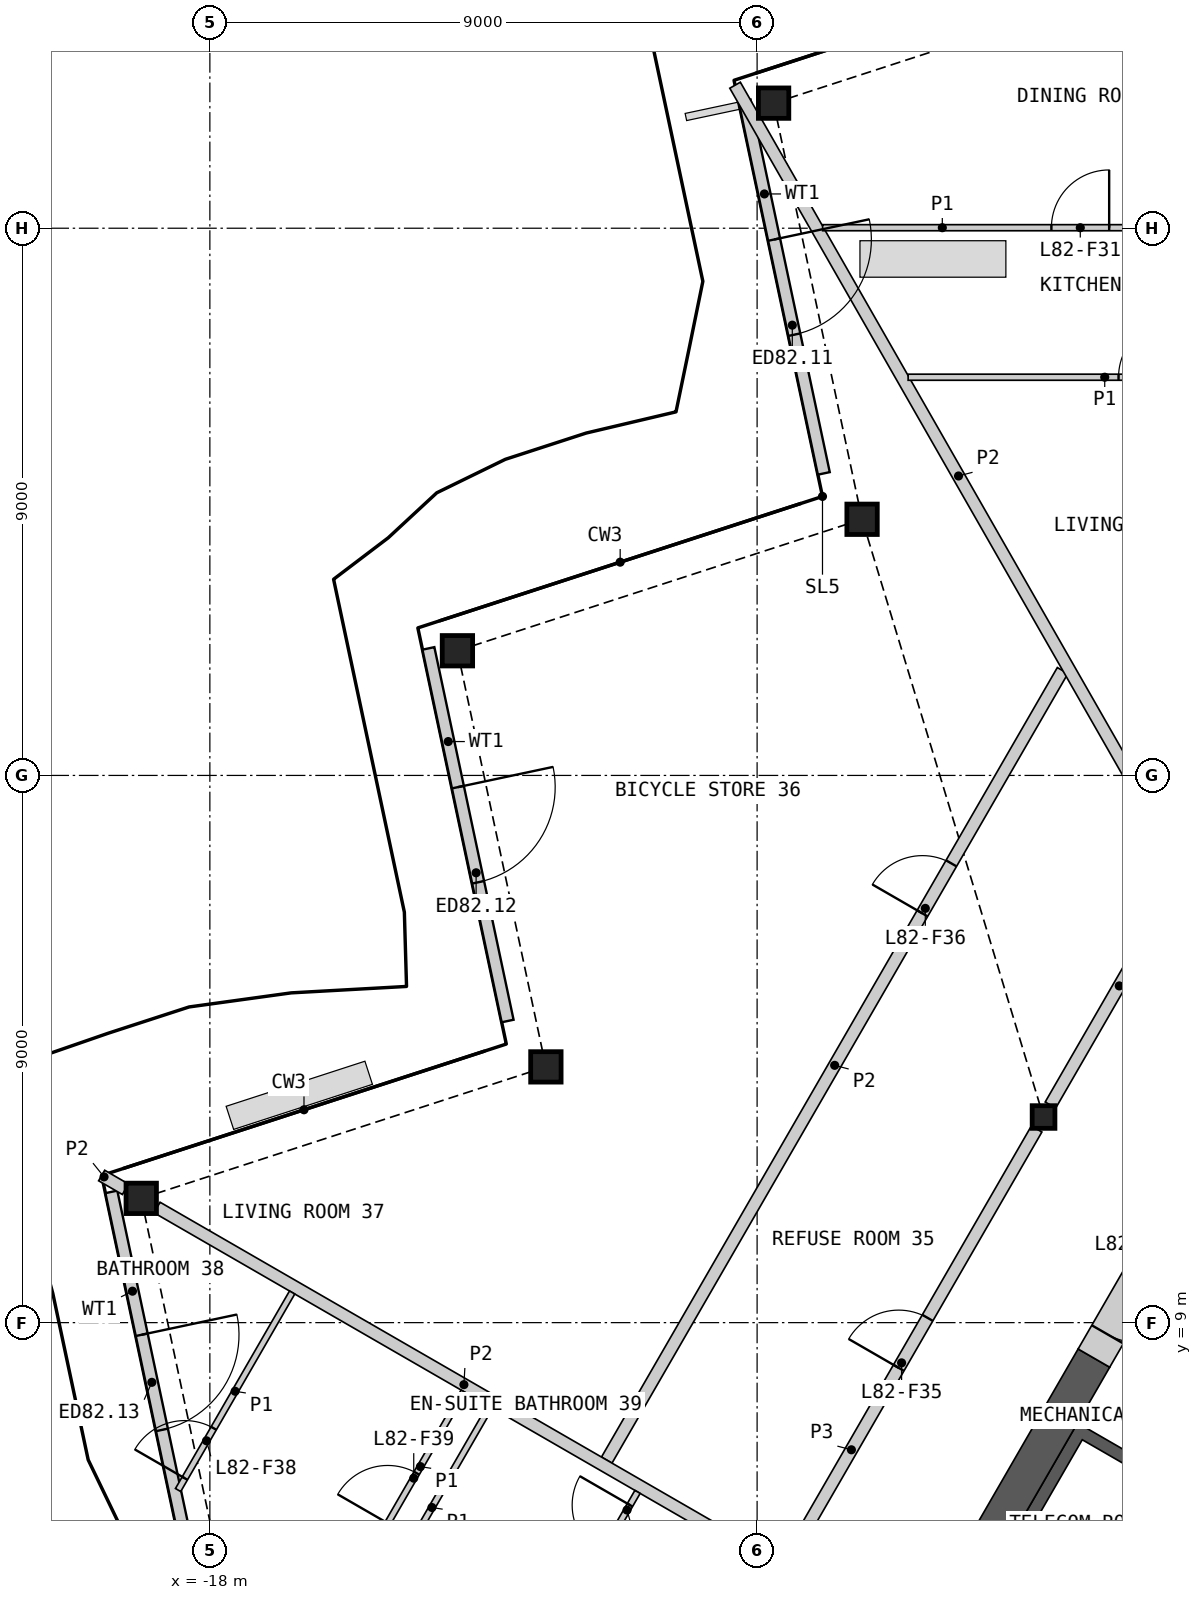
"""IFC4 building model, lengths in metres.
Left out: names, types, materials, properties, quantities, classifications, styles, units other than length and angle.
Written with IfcOpenShell. Run it as: python <this file> out.ifc"""

import sys

from ifc_helpers import new_model, si_unit, direction, frame, frame_2d, origin, origin_2d, place, context, subcontext, project, spatial, polyline, rectangle, hollow_rectangle, i_section, outline, extrude, element, fill, save


model = new_model("IFC4")
c1 = context("Model", 3, precision=1e-05, world=origin(), true_north=direction((0.0, 1.0)))
c2 = subcontext(c1, "Body", "Model", "MODEL_VIEW")
j1 = project(units=[si_unit("LENGTHUNIT", "METRE"), si_unit("PLANEANGLEUNIT", "RADIAN")], contexts=[c1])
p1 = place(None, origin())
s1 = spatial("IfcSite", under=j1, at=p1, CompositionType="ELEMENT")
p2 = place(p1, origin())
s2 = spatial("IfcBuilding", under=s1, at=p2, CompositionType="ELEMENT")
p3 = place(p2, frame((0.0, 0.0, 367.8)))
s3 = spatial("IfcBuildingStorey", under=s2, at=p3, CompositionType="ELEMENT", Elevation=367.8)
for number, where, z_axis, x_axis in (
    (1, (-8.729, 29.057, 0.0), (0.0, 0.0, 1.0), (1.0, 0.0, 0.0)),
    (2, (-7.274, 22.213, 0.0), (0.0, 0.0, 1.0), (1.0, 0.0, 0.0)),
    (3, (-13.929, 20.051, 0.0), (0.0, 0.0, 1.0), (1.0, 0.0, 0.0)),
    (4, (-12.474, 13.206, 0.0), (0.0, 0.0, 1.0), (1.0, 0.0, 0.0)),
    (5, (-19.129, 11.044, 0.0), (0.0, 0.0, 1.0), (1.0, 0.0, 0.0)),
):
    element("IfcColumn", number, at=place(p3, frame(where, z_axis=z_axis, x_axis=x_axis)), inside=s3, PredefinedType="COLUMN", context=c2, shape_type="SweptSolid", body=[
        extrude(hollow_rectangle(XDim=0.5, YDim=0.5, WallThickness=0.03, at=origin_2d()), origin(), (0.0, 0.0, 1.0), 3.4),
    ])
p4 = place(p3, frame((-4.289, 12.382, 0.0), z_axis=(0.0, 0.0, 1.0), x_axis=(1.0, 0.0, 0.0)))
e6 = element("IfcColumn", 6, at=p4, inside=s3, PredefinedType="COLUMN", context=c2, shape_type="SweptSolid", body=[
    extrude(i_section(OverallWidth=0.374, OverallDepth=0.372, WebThickness=0.016, FlangeThickness=0.026, at=origin_2d()), origin(), (0.0, 0.0, 1.0), 3.4),
])
p5 = place(p3, frame((-9.206, 29.096, 0.0), z_axis=(0.0, 0.0, 1.0), x_axis=(0.207889514624, -0.978152314167, 0.0)))
e7 = element("IfcWall", 7, at=p5, inside=s3, PredefinedType="SOLIDWALL", context=c2, shape_type="SweptSolid", body=[
    extrude(rectangle(XDim=6.265, YDim=0.2, at=frame_2d((3.133, 0.0))), origin(), (0.0, 0.0, 1.0), 2.634),
])
p6 = place(p5, frame((2.333, 0.0, 0.0)))
e8 = element("IfcOpeningElement", 8, at=p6, cuts=e7, PredefinedType="OPENING", context=c2, shape_type="SweptSolid", body=[
    extrude(rectangle(XDim=1.6, YDim=2.25, at=frame_2d((0.8, 1.125))), frame((0.0, 0.11, 0.0), z_axis=(0.0, -1.0, 0.0), x_axis=(1.0, 0.0, 0.0)), (0.0, 0.0, 1.0), 0.22),
])
p7 = place(p3, frame((-14.406, 20.089, 0.0), z_axis=(0.0, 0.0, 1.0), x_axis=(0.207889514624, -0.978152314167, 0.0)))
e9 = element("IfcWall", 9, at=p7, inside=s3, PredefinedType="SOLIDWALL", context=c2, shape_type="SweptSolid", body=[
    extrude(rectangle(XDim=6.265, YDim=0.2, at=frame_2d((3.133, 0.0))), origin(), (0.0, 0.0, 1.0), 2.634),
])
p8 = place(p7, frame((2.333, 0.0, 0.0)))
e10 = element("IfcOpeningElement", 10, at=p8, cuts=e9, PredefinedType="OPENING", context=c2, shape_type="SweptSolid", body=[
    extrude(rectangle(XDim=1.6, YDim=2.25, at=frame_2d((0.8, 1.125))), frame((0.0, 0.11, 0.0), z_axis=(0.0, -1.0, 0.0), x_axis=(1.0, 0.0, 0.0)), (0.0, 0.0, 1.0), 0.22),
])
p9 = place(p3, frame((-19.62, 11.15, 0.0), z_axis=(0.0, 0.0, 1.0), x_axis=(0.207933518746, -0.97814296081, 0.0)))
e11 = element("IfcWall", 11, at=p9, inside=s3, PredefinedType="SOLIDWALL", context=c2, shape_type="SweptSolid", body=[
    extrude(rectangle(XDim=6.678, YDim=0.2, at=frame_2d((3.339, 0.0))), origin(), (0.0, 0.0, 1.0), 2.634),
])
p10 = place(p9, frame((2.402, 0.0, 0.0)))
e12 = element("IfcOpeningElement", 12, at=p10, cuts=e11, PredefinedType="OPENING", context=c2, shape_type="SweptSolid", body=[
    extrude(rectangle(XDim=1.6, YDim=2.25, at=frame_2d((0.8, 1.125))), frame((0.0, 0.11, 0.0), z_axis=(0.0, -1.0, 0.0), x_axis=(1.0, 0.0, 0.0)), (0.0, 0.0, 1.0), 0.22),
])
p11 = place(p3, origin())
e13 = element("IfcWall", 13, at=p11, inside=s3, PredefinedType="SHEAR", context=c2, shape_type="SweptSolid", body=[
    extrude(outline(polyline([(-4.96, 0.208), (-7.131, 1.461), (-3.731, 7.35), (-1.561, 6.097), (-1.66, 5.924), (-3.652, 7.074), (-5.752, 3.437), (-3.76, 2.287), (-3.861, 2.113), (-5.852, 3.263), (-6.852, 1.531), (-4.861, 0.381), (-4.96, 0.208)])), origin(), (0.0, 0.0, 1.0), 3.1),
])
p12 = place(p3, frame((-1.631, 5.776, 0.0), z_axis=(0.0, 0.0, 1.0), x_axis=(-0.499992876559, -0.866029516466, 0.0)))
e14 = element("IfcWall", 14, at=p12, inside=s3, PredefinedType="SOLIDWALL", context=c2, shape_type="SweptSolid", body=[
    extrude(rectangle(XDim=6.486, YDim=0.2, at=frame_2d((3.243, 0.0))), origin(), (0.0, 0.0, 1.0), 3.1),
])
p13 = place(p12, frame((1.537, 0.0, 0.0)))
e15 = element("IfcOpeningElement", 15, at=p13, cuts=e14, PredefinedType="OPENING", context=c2, shape_type="SweptSolid", body=[
    extrude(rectangle(XDim=0.9, YDim=2.1, at=frame_2d((0.45, 1.05))), frame((0.0, 0.11, 0.0), z_axis=(0.0, -1.0, 0.0), x_axis=(1.0, 0.0, 0.0)), (0.0, 0.0, 1.0), 0.22),
])
p14 = place(p12, frame((4.837, 0.0, 0.0)))
e16 = element("IfcOpeningElement", 16, at=p14, cuts=e14, PredefinedType="OPENING", context=c2, shape_type="SweptSolid", body=[
    extrude(rectangle(XDim=0.9, YDim=2.1, at=frame_2d((0.45, 1.05))), frame((0.0, 0.11, 0.0), z_axis=(0.0, -1.0, 0.0), x_axis=(1.0, 0.0, 0.0)), (0.0, 0.0, 1.0), 0.22),
])
p15 = place(p3, frame((-3.461, 8.417, 0.0), z_axis=(0.0, 0.0, 1.0), x_axis=(-0.50000391502, -0.866023143435, 0.0)))
e17 = element("IfcWall", 17, at=p15, inside=s3, PredefinedType="SHEAR", context=c2, shape_type="SweptSolid", body=[
    extrude(rectangle(XDim=7.759, YDim=0.6, at=frame_2d((3.879, 0.0))), origin(), (0.0, 0.0, 1.0), 3.1),
])
p16 = place(p3, frame((-2.361, 10.322, 0.0), z_axis=(0.0, 0.0, 1.0), x_axis=(-0.499946605688, -0.86605622881, 0.0)))
e18 = element("IfcWall", 18, at=p16, inside=s3, PredefinedType="SHEAR", context=c2, shape_type="SweptSolid", body=[
    extrude(rectangle(XDim=2.2, YDim=0.6, at=frame_2d((1.1, 0.0))), origin(), (0.0, 0.0, 1.0), 3.1),
])
p17 = place(p16, frame((0.75, 0.0, 0.0)))
e19 = element("IfcOpeningElement", 19, at=p17, cuts=e18, PredefinedType="OPENING", context=c2, shape_type="SweptSolid", body=[
    extrude(rectangle(XDim=1.0, YDim=2.1, at=frame_2d((0.5, 1.05))), frame((0.0, 0.31, 0.0), z_axis=(0.0, -1.0, 0.0), x_axis=(1.0, 0.0, 0.0)), (0.0, 0.0, 1.0), 0.62),
])
p18 = place(p3, frame((-8.465, 5.15, 0.0), z_axis=(0.0, 0.0, 1.0), x_axis=(0.499992155518, 0.866029932751, 0.0)))
e20 = element("IfcWall", 20, at=p18, inside=s3, PredefinedType="PARTITIONING", context=c2, shape_type="SweptSolid", body=[
    extrude(rectangle(XDim=8.123, YDim=0.2, at=frame_2d((4.062, 0.0))), origin(), (0.0, 0.0, 1.0), 3.1),
])
p19 = place(p18, frame((3.587, 0.0, 0.0)))
e21 = element("IfcOpeningElement", 21, at=p19, cuts=e20, PredefinedType="OPENING", context=c2, shape_type="SweptSolid", body=[
    extrude(rectangle(XDim=0.95, YDim=2.1, at=frame_2d((0.475, 1.05))), frame((0.0, 0.11, 0.0), z_axis=(0.0, -1.0, 0.0), x_axis=(1.0, 0.0, 0.0)), (0.0, 0.0, 1.0), 0.22),
])
p20 = place(p3, frame((-4.176, 12.579, 0.0), z_axis=(0.0, 0.0, 1.0), x_axis=(0.499974648164, 0.866040040179, 0.0)))
e22 = element("IfcWall", 22, at=p20, inside=s3, PredefinedType="PARTITIONING", context=c2, shape_type="SweptSolid", body=[
    extrude(rectangle(XDim=4.525, YDim=0.2, at=frame_2d((2.263, 0.0))), origin(), (0.0, 0.0, 1.0), 3.1),
])
p21 = place(p3, frame((-11.473, 6.74, 0.0), z_axis=(0.0, 0.0, 1.0), x_axis=(0.499993542657, 0.866029131901, 0.0)))
e23 = element("IfcWall", 23, at=p21, inside=s3, PredefinedType="PARTITIONING", context=c2, shape_type="SweptSolid", body=[
    extrude(rectangle(XDim=14.994, YDim=0.2, at=frame_2d((7.497, 0.0))), origin(), (0.0, 0.0, 1.0), 2.33),
])
p22 = place(p21, frame((10.383, 0.0, 0.0)))
e24 = element("IfcOpeningElement", 24, at=p22, cuts=e23, PredefinedType="OPENING", context=c2, shape_type="SweptSolid", body=[
    extrude(rectangle(XDim=0.95, YDim=2.1, at=frame_2d((0.475, 1.05))), frame((0.0, 0.11, 0.0), z_axis=(0.0, -1.0, 0.0), x_axis=(1.0, 0.0, 0.0)), (0.0, 0.0, 1.0), 0.22),
])
p23 = place(p3, frame((-9.362, 29.352, 0.0), z_axis=(0.0, 0.0, 1.0), x_axis=(0.496351997927, -0.868121359116, 0.0)))
e25 = element("IfcWall", 25, at=p23, inside=s3, PredefinedType="PARTITIONING", context=c2, shape_type="SweptSolid", body=[
    extrude(rectangle(XDim=14.807, YDim=0.2, at=frame_2d((7.404, 0.0))), origin(), (0.0, 0.0, 1.0), 2.33),
])
p24 = place(p3, frame((-18.869, 10.894, 0.0), z_axis=(0.0, 0.0, 1.0), x_axis=(0.866023724155, -0.500002909193, 0.0)))
e26 = element("IfcWall", 26, at=p24, inside=s3, PredefinedType="PARTITIONING", context=c2, shape_type="SweptSolid", body=[
    extrude(rectangle(XDim=11.655, YDim=0.2, at=frame_2d((5.827, 0.0))), origin(), (0.0, 0.0, 1.0), 2.33),
])
p25 = place(p3, frame((-19.78, 11.42, 0.0), z_axis=(0.0, 0.0, 1.0), x_axis=(0.866104518135, -0.499862944882, 0.0)))
e27 = element("IfcWall", 27, at=p25, inside=s3, PredefinedType="PARTITIONING", context=c2, shape_type="SweptSolid", body=[
    extrude(rectangle(XDim=0.451, YDim=0.2, at=frame_2d((0.226, 0.0))), origin(), (0.0, 0.0, 1.0), 2.33),
])
p26 = place(p3, frame((-7.922, 27.009, 0.0), z_axis=(0.0, 0.0, 1.0), x_axis=(1.0, 0.0, 0.0)))
e28 = element("IfcWall", 28, at=p26, inside=s3, PredefinedType="PARTITIONING", context=c2, shape_type="SweptSolid", body=[
    extrude(rectangle(XDim=7.872, YDim=0.1, at=frame_2d((3.936, 0.0))), origin(), (0.0, 0.0, 1.0), 2.33),
])
p27 = place(p26, frame((3.762, 0.0, 0.0)))
e29 = element("IfcOpeningElement", 29, at=p27, cuts=e28, PredefinedType="OPENING", context=c2, shape_type="SweptSolid", body=[
    extrude(rectangle(XDim=0.95, YDim=2.1, at=frame_2d((0.475, 1.05))), frame((0.0, 0.06, 0.0), z_axis=(0.0, -1.0, 0.0), x_axis=(1.0, 0.0, 0.0)), (0.0, 0.0, 1.0), 0.12),
])
p28 = place(p3, frame((-6.516, 24.549, 0.0), z_axis=(0.0, 0.0, 1.0), x_axis=(1.0, 0.0, 0.0)))
e30 = element("IfcWall", 30, at=p28, inside=s3, PredefinedType="PARTITIONING", context=c2, shape_type="SweptSolid", body=[
    extrude(rectangle(XDim=6.466, YDim=0.1, at=frame_2d((3.233, 0.0))), origin(), (0.0, 0.0, 1.0), 2.33),
])
p29 = place(p28, frame((3.46, 0.0, 0.0)))
e31 = element("IfcOpeningElement", 31, at=p29, cuts=e30, PredefinedType="OPENING", context=c2, shape_type="SweptSolid", body=[
    extrude(rectangle(XDim=0.95, YDim=2.1, at=frame_2d((0.475, 1.05))), frame((0.0, 0.06, 0.0), z_axis=(0.0, -1.0, 0.0), x_axis=(1.0, 0.0, 0.0)), (0.0, 0.0, 1.0), 0.12),
])
p30 = place(p3, frame((-18.523, 6.247, 0.0), z_axis=(0.0, 0.0, 1.0), x_axis=(0.499981580887, 0.866036037803, 0.0)))
e32 = element("IfcWall", 32, at=p30, inside=s3, PredefinedType="PARTITIONING", context=c2, shape_type="SweptSolid", body=[
    extrude(rectangle(XDim=3.752, YDim=0.1, at=frame_2d((1.876, 0.0))), origin(), (0.0, 0.0, 1.0), 2.33),
])
p31 = place(p30, frame((0.222, 0.0, 0.0)))
e33 = element("IfcOpeningElement", 33, at=p31, cuts=e32, PredefinedType="OPENING", context=c2, shape_type="SweptSolid", body=[
    extrude(rectangle(XDim=0.95, YDim=2.1, at=frame_2d((0.475, 1.05))), frame((0.0, 0.06, 0.0), z_axis=(0.0, -1.0, 0.0), x_axis=(1.0, 0.0, 0.0)), (0.0, 0.0, 1.0), 0.12),
])
p32 = place(p3, frame((-15.25, 5.398, 0.0), z_axis=(0.0, 0.0, 1.0), x_axis=(0.499935029643, 0.866062911188, 0.0)))
e34 = element("IfcWall", 34, at=p32, inside=s3, PredefinedType="PARTITIONING", context=c2, shape_type="SweptSolid", body=[
    extrude(rectangle(XDim=2.85, YDim=0.1, at=frame_2d((1.425, 0.0))), origin(), (0.0, 0.0, 1.0), 2.33),
])
p33 = place(p32, frame((0.35, 0.0, 0.0)))
e35 = element("IfcOpeningElement", 35, at=p33, cuts=e34, PredefinedType="OPENING", context=c2, shape_type="SweptSolid", body=[
    extrude(rectangle(XDim=0.95, YDim=2.1, at=frame_2d((0.475, 1.05))), frame((0.0, 0.06, 0.0), z_axis=(0.0, -1.0, 0.0), x_axis=(1.0, 0.0, 0.0)), (0.0, 0.0, 1.0), 0.12),
])
p34 = place(p3, frame((-12.242, 4.008, 0.0), z_axis=(0.0, 0.0, 1.0), x_axis=(0.499948979701, 0.866054858364, 0.0)))
e36 = element("IfcWall", 36, at=p34, inside=s3, PredefinedType="PARTITIONING", context=c2, shape_type="SweptSolid", body=[
    extrude(rectangle(XDim=2.55, YDim=0.1, at=frame_2d((1.275, 0.0))), origin(), (0.0, 0.0, 1.0), 2.33),
])
p35 = place(p34, frame((1.35, 0.0, 0.0)))
e37 = element("IfcOpeningElement", 37, at=p35, cuts=e36, PredefinedType="OPENING", context=c2, shape_type="SweptSolid", body=[
    extrude(rectangle(XDim=0.95, YDim=2.1, at=frame_2d((0.475, 1.05))), frame((0.0, 0.06, 0.0), z_axis=(0.0, -1.0, 0.0), x_axis=(1.0, 0.0, 0.0)), (0.0, 0.0, 1.0), 0.12),
])
p36 = place(p3, frame((-14.667, 5.408, 0.0), z_axis=(0.0, 0.0, 1.0), x_axis=(0.499948979701, 0.866054858364, 0.0)))
e38 = element("IfcWall", 38, at=p36, inside=s3, PredefinedType="PARTITIONING", context=c2, shape_type="SweptSolid", body=[
    extrude(rectangle(XDim=2.55, YDim=0.1, at=frame_2d((1.275, 0.0))), origin(), (0.0, 0.0, 1.0), 2.33),
])
p37 = place(p6, origin())
e39 = element("IfcDoor", 39, at=p37, inside=s3, OperationType="DOUBLE_DOOR_SINGLE_SWING", PredefinedType="DOOR", context=c2, shape_type="SweptSolid", body=[
    extrude(rectangle(XDim=1.6, YDim=2.25, at=frame_2d((0.8, 1.125))), frame((0.0, 0.025, 0.0), z_axis=(0.0, -1.0, 0.0), x_axis=(1.0, 0.0, 0.0)), (0.0, 0.0, 1.0), 0.05),
])
fill(e8, e39)
p38 = place(p8, origin())
e40 = element("IfcDoor", 40, at=p38, inside=s3, OperationType="DOUBLE_DOOR_SINGLE_SWING", PredefinedType="DOOR", context=c2, shape_type="SweptSolid", body=[
    extrude(rectangle(XDim=1.6, YDim=2.25, at=frame_2d((0.8, 1.125))), frame((0.0, 0.025, 0.0), z_axis=(0.0, -1.0, 0.0), x_axis=(1.0, 0.0, 0.0)), (0.0, 0.0, 1.0), 0.05),
])
fill(e10, e40)
p39 = place(p10, origin())
e41 = element("IfcDoor", 41, at=p39, inside=s3, OperationType="DOUBLE_DOOR_SINGLE_SWING", PredefinedType="DOOR", context=c2, shape_type="SweptSolid", body=[
    extrude(rectangle(XDim=1.6, YDim=2.25, at=frame_2d((0.8, 1.125))), frame((0.0, 0.025, 0.0), z_axis=(0.0, -1.0, 0.0), x_axis=(1.0, 0.0, 0.0)), (0.0, 0.0, 1.0), 0.05),
])
fill(e12, e41)
p40 = place(p17, origin())
e42 = element("IfcDoor", 42, at=p40, inside=s3, OperationType="SINGLE_SWING_LEFT", PredefinedType="DOOR", context=c2, shape_type="SweptSolid", body=[
    extrude(rectangle(XDim=1.0, YDim=2.1, at=frame_2d((0.5, 1.05))), frame((0.0, 0.055, 0.0), z_axis=(0.0, -1.0, 0.0), x_axis=(1.0, 0.0, 0.0)), (0.0, 0.0, 1.0), 0.05),
])
fill(e19, e42)
p41 = place(p29, origin())
e43 = element("IfcDoor", 43, at=p41, inside=s3, OperationType="SINGLE_SWING_RIGHT", PredefinedType="DOOR", context=c2, shape_type="SweptSolid", body=[
    extrude(rectangle(XDim=0.95, YDim=2.1, at=frame_2d((0.475, 1.05))), frame((0.0, 0.025, 0.0), z_axis=(0.0, -1.0, 0.0), x_axis=(1.0, 0.0, 0.0)), (0.0, 0.0, 1.0), 0.05),
])
fill(e31, e43)
p42 = place(p27, origin())
e44 = element("IfcDoor", 44, at=p42, inside=s3, OperationType="SINGLE_SWING_RIGHT", PredefinedType="DOOR", context=c2, shape_type="SweptSolid", body=[
    extrude(rectangle(XDim=0.95, YDim=2.1, at=frame_2d((0.475, 1.05))), frame((0.0, 0.025, 0.0), z_axis=(0.0, -1.0, 0.0), x_axis=(1.0, 0.0, 0.0)), (0.0, 0.0, 1.0), 0.05),
])
fill(e29, e44)
p43 = place(p19, origin())
e45 = element("IfcDoor", 45, at=p43, inside=s3, OperationType="SINGLE_SWING_LEFT", PredefinedType="DOOR", context=c2, shape_type="SweptSolid", body=[
    extrude(rectangle(XDim=0.95, YDim=2.1, at=frame_2d((0.475, 1.05))), frame((0.0, 0.025, 0.0), z_axis=(0.0, -1.0, 0.0), x_axis=(1.0, 0.0, 0.0)), (0.0, 0.0, 1.0), 0.05),
])
fill(e21, e45)
p44 = place(p22, origin())
e46 = element("IfcDoor", 46, at=p44, inside=s3, OperationType="SINGLE_SWING_LEFT", PredefinedType="DOOR", context=c2, shape_type="SweptSolid", body=[
    extrude(rectangle(XDim=0.95, YDim=2.1, at=frame_2d((0.475, 1.05))), frame((0.0, 0.025, 0.0), z_axis=(0.0, -1.0, 0.0), x_axis=(1.0, 0.0, 0.0)), (0.0, 0.0, 1.0), 0.05),
])
fill(e24, e46)
p45 = place(p31, origin())
e47 = element("IfcDoor", 47, at=p45, inside=s3, OperationType="SINGLE_SWING_LEFT", PredefinedType="DOOR", context=c2, shape_type="SweptSolid", body=[
    extrude(rectangle(XDim=0.95, YDim=2.1, at=frame_2d((0.475, 1.05))), frame((0.0, 0.025, 0.0), z_axis=(0.0, -1.0, 0.0), x_axis=(1.0, 0.0, 0.0)), (0.0, 0.0, 1.0), 0.05),
])
fill(e33, e47)
p46 = place(p33, origin())
e48 = element("IfcDoor", 48, at=p46, inside=s3, OperationType="SINGLE_SWING_LEFT", PredefinedType="DOOR", context=c2, shape_type="SweptSolid", body=[
    extrude(rectangle(XDim=0.95, YDim=2.1, at=frame_2d((0.475, 1.05))), frame((0.0, 0.025, 0.0), z_axis=(0.0, -1.0, 0.0), x_axis=(1.0, 0.0, 0.0)), (0.0, 0.0, 1.0), 0.05),
])
fill(e35, e48)
p47 = place(p35, origin())
e49 = element("IfcDoor", 49, at=p47, inside=s3, OperationType="SINGLE_SWING_RIGHT", PredefinedType="DOOR", context=c2, shape_type="SweptSolid", body=[
    extrude(rectangle(XDim=0.95, YDim=2.1, at=frame_2d((0.475, 1.05))), frame((0.0, 0.025, 0.0), z_axis=(0.0, -1.0, 0.0), x_axis=(1.0, 0.0, 0.0)), (0.0, 0.0, 1.0), 0.05),
])
fill(e37, e49)
save(model, sys.argv[1])
